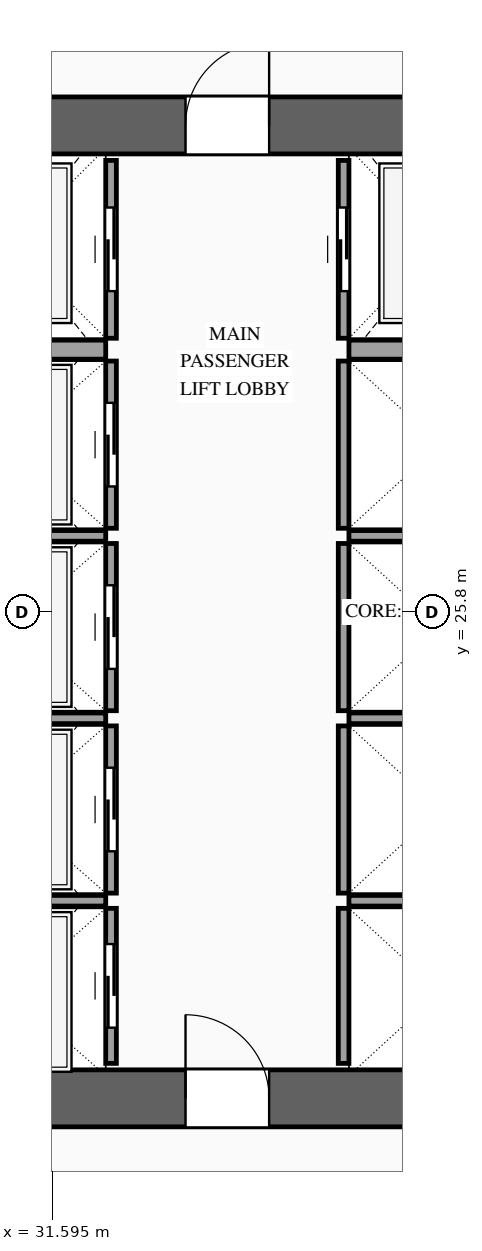
"""IFC4 building model, lengths in metres.
Left out: names, types, materials, properties, quantities, classifications, styles, units other than length and angle.
Written with IfcOpenShell. Run it as: python <this file> out.ifc"""

import sys

from ifc_helpers import new_model, si_unit, direction, frame, frame_2d, origin, place, context, subcontext, project, spatial, rectangle, extrude, source, transform, mapped, element, fill, save


model = new_model("IFC4")
c1 = context("Model", 3, precision=1e-05, world=origin(), true_north=direction((0.0, 1.0)))
c2 = subcontext(c1, "Body", "Model", "MODEL_VIEW")
j1 = project(units=[si_unit("LENGTHUNIT", "METRE"), si_unit("PLANEANGLEUNIT", "RADIAN")], contexts=[c1])
p1 = place(None, origin())
s1 = spatial("IfcSite", under=j1, at=p1, CompositionType="ELEMENT")
p2 = place(p1, origin())
s2 = spatial("IfcBuilding", under=s1, at=p2, CompositionType="ELEMENT")
p3 = place(p2, frame((0.0, 0.0, 122.6)))
s3 = spatial("IfcBuildingStorey", under=s2, at=p3, CompositionType="ELEMENT", Elevation=122.6)
p4 = place(p3, frame((23.425, 19.4, 0.0), z_axis=(0.0, 0.0, 1.0), x_axis=(1.0, 0.0, 0.0)))
e1 = element("IfcWall", 1, at=p4, inside=s3, PredefinedType="SHEAR", context=c2, shape_type="SweptSolid", body=[
    extrude(rectangle(XDim=27.15, YDim=0.75, at=frame_2d((13.575, 0.0))), origin(), (0.0, 0.0, 1.0), 3.6),
])
p5 = place(p4, frame((2.025, 0.0, 0.0)))
e2 = element("IfcOpeningElement", 2, at=p5, cuts=e1, PredefinedType="OPENING", context=c2, shape_type="SweptSolid", body=[
    extrude(rectangle(XDim=1.1, YDim=2.2, at=frame_2d((0.55, 1.1))), frame((0.0, 0.39, 0.0), z_axis=(0.0, -1.0, 0.0), x_axis=(1.0, 0.0, 0.0)), (0.0, 0.0, 1.0), 0.78),
])
p6 = place(p4, frame((9.925, 0.0, 0.0)))
e3 = element("IfcOpeningElement", 3, at=p6, cuts=e1, PredefinedType="OPENING", context=c2, shape_type="SweptSolid", body=[
    extrude(rectangle(XDim=1.1, YDim=2.2, at=frame_2d((0.55, 1.1))), frame((0.0, 0.39, 0.0), z_axis=(0.0, -1.0, 0.0), x_axis=(1.0, 0.0, 0.0)), (0.0, 0.0, 1.0), 0.78),
])
p7 = place(p4, frame((23.125, 0.0, 0.0)))
e4 = element("IfcOpeningElement", 4, at=p7, cuts=e1, PredefinedType="OPENING", context=c2, shape_type="SweptSolid", body=[
    extrude(rectangle(XDim=1.1, YDim=2.2, at=frame_2d((0.55, 1.1))), frame((0.0, 0.39, 0.0), z_axis=(0.0, -1.0, 0.0), x_axis=(1.0, 0.0, 0.0)), (0.0, 0.0, 1.0), 0.78),
])
p8 = place(p4, frame((19.745, 0.0, 0.0)))
e5 = element("IfcOpeningElement", 5, at=p8, cuts=e1, PredefinedType="OPENING", context=c2, shape_type="SweptSolid", body=[
    extrude(rectangle(XDim=0.9, YDim=2.15, at=frame_2d((0.45, 1.075))), frame((0.0, 0.39, 0.0), z_axis=(0.0, -1.0, 0.0), x_axis=(1.0, 0.0, 0.0)), (0.0, 0.0, 1.0), 0.78),
])
p9 = place(p4, frame((18.305, 0.0, 0.0)))
e6 = element("IfcOpeningElement", 6, at=p9, cuts=e1, PredefinedType="OPENING", context=c2, shape_type="SweptSolid", body=[
    extrude(rectangle(XDim=0.9, YDim=2.15, at=frame_2d((0.45, 1.075))), frame((0.0, 0.39, 0.0), z_axis=(0.0, -1.0, 0.0), x_axis=(1.0, 0.0, 0.0)), (0.0, 0.0, 1.0), 0.78),
])
p10 = place(p3, frame((23.425, 32.2, 0.0), z_axis=(0.0, 0.0, 1.0), x_axis=(1.0, 0.0, 0.0)))
e7 = element("IfcWall", 7, at=p10, inside=s3, PredefinedType="SHEAR", context=c2, shape_type="SweptSolid", body=[
    extrude(rectangle(XDim=27.15, YDim=0.75, at=frame_2d((13.575, 0.0))), origin(), (0.0, 0.0, 1.0), 3.6),
])
p11 = place(p10, frame((4.645, 0.0, 0.0)))
e8 = element("IfcOpeningElement", 8, at=p11, cuts=e7, PredefinedType="OPENING", context=c2, shape_type="SweptSolid", body=[
    extrude(rectangle(XDim=0.9, YDim=2.15, at=frame_2d((0.45, 1.075))), frame((0.0, 0.39, 0.0), z_axis=(0.0, -1.0, 0.0), x_axis=(1.0, 0.0, 0.0)), (0.0, 0.0, 1.0), 0.78),
])
p12 = place(p10, frame((9.925, 0.0, 0.0)))
e9 = element("IfcOpeningElement", 9, at=p12, cuts=e7, PredefinedType="OPENING", context=c2, shape_type="SweptSolid", body=[
    extrude(rectangle(XDim=1.1, YDim=2.2, at=frame_2d((0.55, 1.1))), frame((0.0, 0.39, 0.0), z_axis=(0.0, -1.0, 0.0), x_axis=(1.0, 0.0, 0.0)), (0.0, 0.0, 1.0), 0.78),
])
p13 = place(p10, frame((15.775, 0.0, 0.0)))
e10 = element("IfcOpeningElement", 10, at=p13, cuts=e7, PredefinedType="OPENING", context=c2, shape_type="SweptSolid", body=[
    extrude(rectangle(XDim=1.1, YDim=2.2, at=frame_2d((0.55, 1.1))), frame((0.0, 0.39, 0.0), z_axis=(0.0, -1.0, 0.0), x_axis=(1.0, 0.0, 0.0)), (0.0, 0.0, 1.0), 0.78),
])
p14 = place(p3, frame((32.37, 19.86, 0.0), z_axis=(0.0, 0.0, 1.0), x_axis=(0.0, 1.0, 0.0)))
e11 = element("IfcWall", 11, at=p14, inside=s3, PredefinedType="SOLIDWALL", context=c2, shape_type="SweptSolid", body=[
    extrude(rectangle(XDim=2.04, YDim=0.14, at=frame_2d((1.02, 0.0))), origin(), (0.0, 0.0, 1.0), 3.38),
])
p15 = place(p14, frame((0.47, 0.0, 0.0)))
e12 = element("IfcOpeningElement", 12, at=p15, cuts=e11, PredefinedType="OPENING", context=c2, shape_type="SweptSolid", body=[
    extrude(rectangle(XDim=1.1, YDim=2.2, at=frame_2d((0.55, 1.1))), frame((0.0, 0.085, 0.0), z_axis=(0.0, -1.0, 0.0), x_axis=(1.0, 0.0, 0.0)), (0.0, 0.0, 1.0), 0.17),
])
m1 = source(origin(), c2, "Body", "SweptSolid", [
    extrude(rectangle(XDim=2.5, YDim=0.14, at=frame_2d((1.25, 0.0))), origin(), (0.0, 0.0, 1.0), 3.38),
])
p16 = place(p3, frame((29.8, 22.0, 0.0), z_axis=(0.0, 0.0, 1.0), x_axis=(1.0, 0.0, 0.0)))
e13 = element("IfcWall", 13, at=p16, inside=s3, PredefinedType="SOLIDWALL", context=c2, shape_type="MappedRepresentation", body=[
    mapped(m1, transform((0.0, 0.0, 0.0), scale=1.0)),
])
p17 = place(p3, frame((32.37, 22.1, 0.0), z_axis=(0.0, 0.0, 1.0), x_axis=(0.0, 1.0, 0.0)))
e14 = element("IfcWall", 14, at=p17, inside=s3, PredefinedType="SOLIDWALL", context=c2, shape_type="SweptSolid", body=[
    extrude(rectangle(XDim=2.2, YDim=0.14, at=frame_2d((1.1, 0.0))), origin(), (0.0, 0.0, 1.0), 3.38),
])
p18 = place(p17, frame((0.55, 0.0, 0.0)))
e15 = element("IfcOpeningElement", 15, at=p18, cuts=e14, PredefinedType="OPENING", context=c2, shape_type="SweptSolid", body=[
    extrude(rectangle(XDim=1.1, YDim=2.2, at=frame_2d((0.55, 1.1))), frame((0.0, 0.085, 0.0), z_axis=(0.0, -1.0, 0.0), x_axis=(1.0, 0.0, 0.0)), (0.0, 0.0, 1.0), 0.17),
])
p19 = place(p3, frame((29.8, 24.4, 0.0), z_axis=(0.0, 0.0, 1.0), x_axis=(1.0, 0.0, 0.0)))
e16 = element("IfcWall", 16, at=p19, inside=s3, PredefinedType="SOLIDWALL", context=c2, shape_type="MappedRepresentation", body=[
    mapped(m1, transform((0.0, 0.0, 0.0), scale=1.0)),
])
p20 = place(p3, frame((32.37, 24.5, 0.0), z_axis=(0.0, 0.0, 1.0), x_axis=(0.0, 1.0, 0.0)))
e17 = element("IfcWall", 17, at=p20, inside=s3, PredefinedType="SOLIDWALL", context=c2, shape_type="SweptSolid", body=[
    extrude(rectangle(XDim=2.2, YDim=0.14, at=frame_2d((1.1, 0.0))), origin(), (0.0, 0.0, 1.0), 3.38),
])
p21 = place(p20, frame((0.55, 0.0, 0.0)))
e18 = element("IfcOpeningElement", 18, at=p21, cuts=e17, PredefinedType="OPENING", context=c2, shape_type="SweptSolid", body=[
    extrude(rectangle(XDim=1.1, YDim=2.2, at=frame_2d((0.55, 1.1))), frame((0.0, 0.085, 0.0), z_axis=(0.0, -1.0, 0.0), x_axis=(1.0, 0.0, 0.0)), (0.0, 0.0, 1.0), 0.17),
])
p22 = place(p3, frame((29.8, 26.8, 0.0), z_axis=(0.0, 0.0, 1.0), x_axis=(1.0, 0.0, 0.0)))
e19 = element("IfcWall", 19, at=p22, inside=s3, PredefinedType="SOLIDWALL", context=c2, shape_type="MappedRepresentation", body=[
    mapped(m1, transform((0.0, 0.0, 0.0), scale=1.0)),
])
p23 = place(p3, frame((32.37, 26.9, 0.0), z_axis=(0.0, 0.0, 1.0), x_axis=(0.0, 1.0, 0.0)))
e20 = element("IfcWall", 20, at=p23, inside=s3, PredefinedType="SOLIDWALL", context=c2, shape_type="SweptSolid", body=[
    extrude(rectangle(XDim=2.2, YDim=0.14, at=frame_2d((1.1, 0.0))), origin(), (0.0, 0.0, 1.0), 3.38),
])
p24 = place(p23, frame((0.55, 0.0, 0.0)))
e21 = element("IfcOpeningElement", 21, at=p24, cuts=e20, PredefinedType="OPENING", context=c2, shape_type="SweptSolid", body=[
    extrude(rectangle(XDim=1.1, YDim=2.2, at=frame_2d((0.55, 1.1))), frame((0.0, 0.085, 0.0), z_axis=(0.0, -1.0, 0.0), x_axis=(1.0, 0.0, 0.0)), (0.0, 0.0, 1.0), 0.17),
])
p25 = place(p3, frame((32.37, 29.4, 0.0), z_axis=(0.0, 0.0, 1.0), x_axis=(0.0, 1.0, 0.0)))
e22 = element("IfcWall", 22, at=p25, inside=s3, PredefinedType="SOLIDWALL", context=c2, shape_type="SweptSolid", body=[
    extrude(rectangle(XDim=2.34, YDim=0.14, at=frame_2d((1.17, 0.0))), origin(), (0.0, 0.0, 1.0), 3.38),
])
p26 = place(p25, frame((0.62, 0.0, 0.0)))
e23 = element("IfcOpeningElement", 23, at=p26, cuts=e22, PredefinedType="OPENING", context=c2, shape_type="SweptSolid", body=[
    extrude(rectangle(XDim=1.1, YDim=2.2, at=frame_2d((0.55, 1.1))), frame((0.0, 0.085, 0.0), z_axis=(0.0, -1.0, 0.0), x_axis=(1.0, 0.0, 0.0)), (0.0, 0.0, 1.0), 0.17),
])
m2 = source(origin(), c2, "Body", "SweptSolid", [
    extrude(rectangle(XDim=2.5, YDim=0.25, at=frame_2d((1.25, 0.0))), origin(), (0.0, 0.0, 1.0), 3.38),
])
p27 = place(p3, frame((29.8, 29.25, 0.0), z_axis=(0.0, 0.0, 1.0), x_axis=(1.0, 0.0, 0.0)))
e24 = element("IfcWall", 24, at=p27, inside=s3, PredefinedType="SOLIDWALL", context=c2, shape_type="MappedRepresentation", body=[
    mapped(m2, transform((0.0, 0.0, 0.0), scale=1.0)),
])
m3 = source(origin(), c2, "Body", "SweptSolid", [
    extrude(rectangle(XDim=2.04, YDim=0.14, at=frame_2d((1.02, 0.0))), origin(), (0.0, 0.0, 1.0), 3.38),
])
p28 = place(p3, frame((35.43, 19.86, 0.0), z_axis=(0.0, 0.0, 1.0), x_axis=(0.0, 1.0, 0.0)))
e25 = element("IfcWall", 25, at=p28, inside=s3, PredefinedType="SOLIDWALL", context=c2, shape_type="MappedRepresentation", body=[
    mapped(m3, transform((0.0, 0.0, 0.0), scale=1.0)),
])
m4 = source(origin(), c2, "Body", "SweptSolid", [
    extrude(rectangle(XDim=2.4, YDim=0.14, at=frame_2d((1.2, 0.0))), origin(), (0.0, 0.0, 1.0), 3.38),
])
p29 = place(p3, frame((35.5, 22.0, 0.0), z_axis=(0.0, 0.0, 1.0), x_axis=(1.0, 0.0, 0.0)))
e26 = element("IfcWall", 26, at=p29, inside=s3, PredefinedType="SOLIDWALL", context=c2, shape_type="MappedRepresentation", body=[
    mapped(m4, transform((0.0, 0.0, 0.0), scale=1.0)),
])
m5 = source(origin(), c2, "Body", "SweptSolid", [
    extrude(rectangle(XDim=2.2, YDim=0.14, at=frame_2d((1.1, 0.0))), origin(), (0.0, 0.0, 1.0), 3.38),
])
p30 = place(p3, frame((35.43, 22.1, 0.0), z_axis=(0.0, 0.0, 1.0), x_axis=(0.0, 1.0, 0.0)))
e27 = element("IfcWall", 27, at=p30, inside=s3, PredefinedType="SOLIDWALL", context=c2, shape_type="MappedRepresentation", body=[
    mapped(m5, transform((0.0, 0.0, 0.0), scale=1.0)),
])
p31 = place(p3, frame((35.5, 24.4, 0.0), z_axis=(0.0, 0.0, 1.0), x_axis=(1.0, 0.0, 0.0)))
e28 = element("IfcWall", 28, at=p31, inside=s3, PredefinedType="SOLIDWALL", context=c2, shape_type="MappedRepresentation", body=[
    mapped(m4, transform((0.0, 0.0, 0.0), scale=1.0)),
])
p32 = place(p3, frame((35.43, 24.5, 0.0), z_axis=(0.0, 0.0, 1.0), x_axis=(0.0, 1.0, 0.0)))
e29 = element("IfcWall", 29, at=p32, inside=s3, PredefinedType="SOLIDWALL", context=c2, shape_type="MappedRepresentation", body=[
    mapped(m5, transform((0.0, 0.0, 0.0), scale=1.0)),
])
p33 = place(p3, frame((35.5, 26.8, 0.0), z_axis=(0.0, 0.0, 1.0), x_axis=(1.0, 0.0, 0.0)))
e30 = element("IfcWall", 30, at=p33, inside=s3, PredefinedType="SOLIDWALL", context=c2, shape_type="MappedRepresentation", body=[
    mapped(m4, transform((0.0, 0.0, 0.0), scale=1.0)),
])
m6 = source(origin(), c2, "Body", "SweptSolid", [
    extrude(rectangle(XDim=2.2, YDim=0.14, at=frame_2d((1.1, 0.0))), origin(), (0.0, 0.0, 1.0), 3.38),
])
p34 = place(p3, frame((35.43, 26.9, 0.0), z_axis=(0.0, 0.0, 1.0), x_axis=(0.0, 1.0, 0.0)))
e31 = element("IfcWall", 31, at=p34, inside=s3, PredefinedType="SOLIDWALL", context=c2, shape_type="MappedRepresentation", body=[
    mapped(m6, transform((0.0, 0.0, 0.0), scale=1.0)),
])
p35 = place(p3, frame((35.43, 29.4, 0.0), z_axis=(0.0, 0.0, 1.0), x_axis=(0.0, 1.0, 0.0)))
e32 = element("IfcWall", 32, at=p35, inside=s3, PredefinedType="SOLIDWALL", context=c2, shape_type="SweptSolid", body=[
    extrude(rectangle(XDim=2.34, YDim=0.14, at=frame_2d((1.17, 0.0))), origin(), (0.0, 0.0, 1.0), 3.38),
])
p36 = place(p35, frame((0.62, 0.0, 0.0)))
e33 = element("IfcOpeningElement", 33, at=p36, cuts=e32, PredefinedType="OPENING", context=c2, shape_type="SweptSolid", body=[
    extrude(rectangle(XDim=1.1, YDim=2.2, at=frame_2d((0.55, 1.1))), frame((0.0, 0.085, 0.0), z_axis=(0.0, -1.0, 0.0), x_axis=(1.0, 0.0, 0.0)), (0.0, 0.0, 1.0), 0.17),
])
m7 = source(origin(), c2, "Body", "SweptSolid", [
    extrude(rectangle(XDim=2.4, YDim=0.25, at=frame_2d((1.2, 0.0))), origin(), (0.0, 0.0, 1.0), 3.38),
])
p37 = place(p3, frame((35.5, 29.25, 0.0), z_axis=(0.0, 0.0, 1.0), x_axis=(1.0, 0.0, 0.0)))
e34 = element("IfcWall", 34, at=p37, inside=s3, PredefinedType="SOLIDWALL", context=c2, shape_type="MappedRepresentation", body=[
    mapped(m7, transform((0.0, 0.0, 0.0), scale=1.0)),
])
m8 = source(origin(), c2, "Body", "SweptSolid", [
    extrude(rectangle(XDim=1.1, YDim=2.2, at=frame_2d((0.55, 1.1))), frame((0.0, 0.025, 0.0), z_axis=(0.0, -1.0, 0.0), x_axis=(1.0, 0.0, 0.0)), (0.0, 0.0, 1.0), 0.05),
])
p38 = place(p15, origin())
e35 = element("IfcDoor", 35, at=p38, inside=s3, OperationType="SLIDING_TO_LEFT", PredefinedType="DOOR", context=c2, shape_type="MappedRepresentation", body=[
    mapped(m8, transform((0.0, 0.0, 0.0), scale=1.0)),
])
fill(e12, e35)
p39 = place(p18, origin())
e36 = element("IfcDoor", 36, at=p39, inside=s3, OperationType="SLIDING_TO_RIGHT", PredefinedType="DOOR", context=c2, shape_type="MappedRepresentation", body=[
    mapped(m8, transform((0.0, 0.0, 0.0), scale=1.0)),
])
fill(e15, e36)
p40 = place(p21, origin())
e37 = element("IfcDoor", 37, at=p40, inside=s3, OperationType="SLIDING_TO_LEFT", PredefinedType="DOOR", context=c2, shape_type="MappedRepresentation", body=[
    mapped(m8, transform((0.0, 0.0, 0.0), scale=1.0)),
])
fill(e18, e37)
p41 = place(p24, origin())
e38 = element("IfcDoor", 38, at=p41, inside=s3, OperationType="SLIDING_TO_RIGHT", PredefinedType="DOOR", context=c2, shape_type="MappedRepresentation", body=[
    mapped(m8, transform((0.0, 0.0, 0.0), scale=1.0)),
])
fill(e21, e38)
p42 = place(p26, origin())
e39 = element("IfcDoor", 39, at=p42, inside=s3, OperationType="SLIDING_TO_LEFT", PredefinedType="DOOR", context=c2, shape_type="MappedRepresentation", body=[
    mapped(m8, transform((0.0, 0.0, 0.0), scale=1.0)),
])
fill(e23, e39)
p43 = place(p36, origin())
e40 = element("IfcDoor", 40, at=p43, inside=s3, OperationType="SLIDING_TO_RIGHT", PredefinedType="DOOR", context=c2, shape_type="MappedRepresentation", body=[
    mapped(m8, transform((0.0, 0.0, 0.0), scale=1.0)),
])
fill(e33, e40)
m9 = source(origin(), c2, "Body", "SweptSolid", [
    extrude(rectangle(XDim=1.1, YDim=2.2, at=frame_2d((0.55, 1.1))), frame((0.0, 0.025, 0.0), z_axis=(0.0, -1.0, 0.0), x_axis=(1.0, 0.0, 0.0)), (0.0, 0.0, 1.0), 0.05),
])
p44 = place(p6, origin())
e41 = element("IfcDoor", 41, at=p44, inside=s3, OperationType="SINGLE_SWING_LEFT", PredefinedType="DOOR", context=c2, shape_type="MappedRepresentation", body=[
    mapped(m9, transform((0.0, 0.0, 0.0), scale=1.0)),
])
fill(e3, e41)
p45 = place(p12, origin())
e42 = element("IfcDoor", 42, at=p45, inside=s3, OperationType="SINGLE_SWING_RIGHT", PredefinedType="DOOR", context=c2, shape_type="MappedRepresentation", body=[
    mapped(m9, transform((0.0, 0.0, 0.0), scale=1.0)),
])
fill(e9, e42)
save(model, sys.argv[1])
